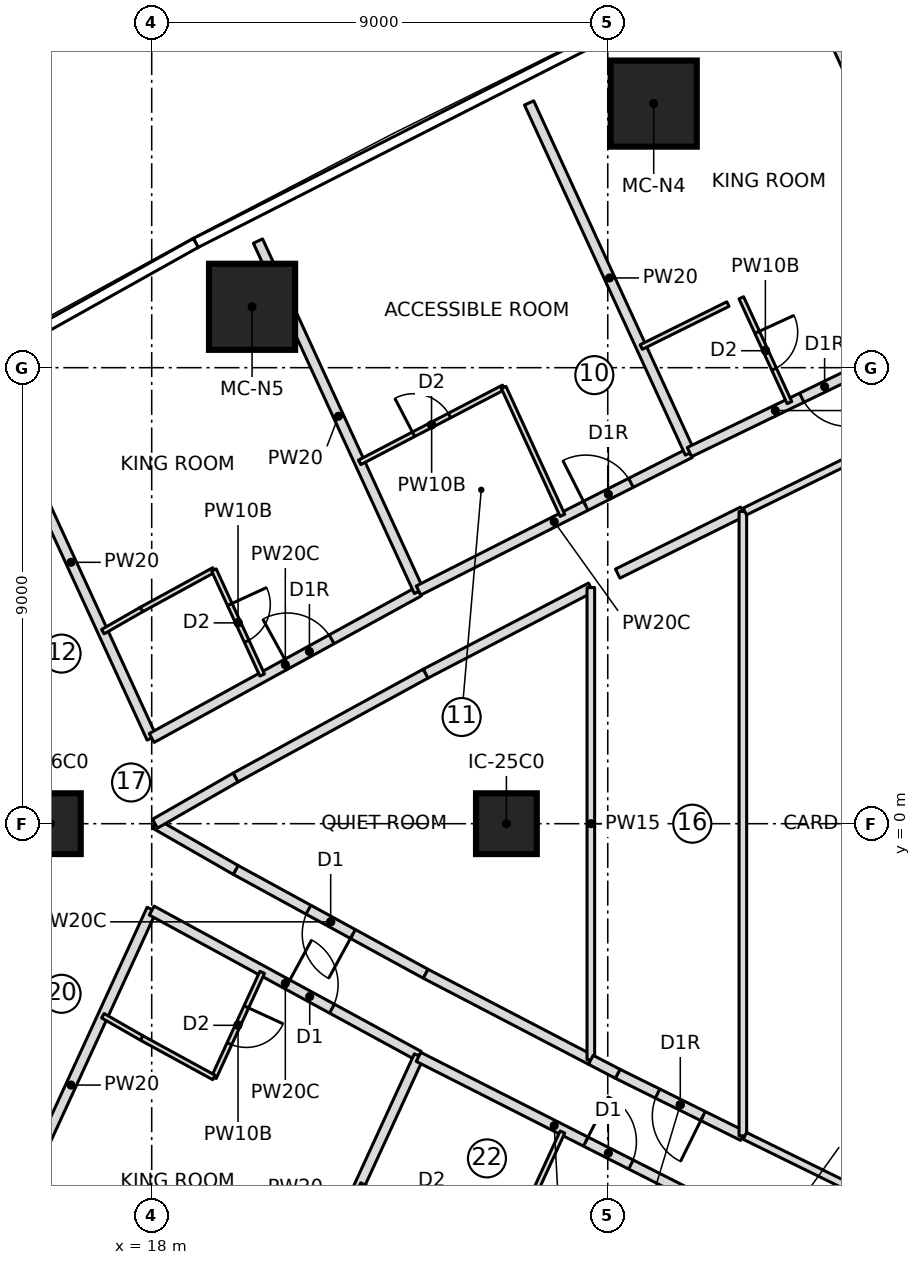
"""IFC4 building model, lengths in metres.
Left out: names, types, materials, properties, quantities, classifications, styles, units other than length and angle.
Written with IfcOpenShell. Run it as: python <this file> out.ifc"""

import sys

from ifc_helpers import new_model, si_unit, direction, frame, frame_2d, origin, origin_2d, place, context, subcontext, project, spatial, rectangle, extrude, element, fill, save


model = new_model("IFC4")
c1 = context("Model", 3, precision=1e-05, world=origin(), true_north=direction((0.0, 1.0)))
c2 = subcontext(c1, "Body", "Model", "MODEL_VIEW")
j1 = project(units=[si_unit("LENGTHUNIT", "METRE"), si_unit("PLANEANGLEUNIT", "RADIAN")], contexts=[c1])
p1 = place(None, origin())
s1 = spatial("IfcSite", under=j1, at=p1, CompositionType="ELEMENT")
p2 = place(p1, origin())
s2 = spatial("IfcBuilding", under=s1, at=p2, CompositionType="ELEMENT")
p3 = place(p2, frame((0.0, 0.0, 109.75)))
s3 = spatial("IfcBuildingStorey", under=s2, at=p3, CompositionType="ELEMENT", Elevation=109.75)
for number, where, z_axis, x_axis in (
    (1, (27.907, 14.212, 0.0), (0.0, 0.0, 1.0), (1.0, 0.0, 0.0)),
    (2, (19.981, 10.202, 0.0), (0.0, 0.0, 1.0), (1.0, 0.0, 0.0)),
):
    element("IfcColumn", number, at=place(p3, frame(where, z_axis=z_axis, x_axis=x_axis)), inside=s3, PredefinedType="COLUMN", context=c2, shape_type="SweptSolid", body=[
        extrude(rectangle(XDim=1.7, YDim=1.7, at=origin_2d()), origin(), (0.0, 0.0, 1.0), 3.55),
    ])
for number, where, z_axis, x_axis in (
    (3, (16.0, 0.0, 0.0), (0.0, 0.0, 1.0), (1.0, 0.0, 0.0)),
    (4, (25.0, 0.0, 0.0), (0.0, 0.0, 1.0), (1.0, 0.0, 0.0)),
):
    element("IfcColumn", number, at=place(p3, frame(where, z_axis=z_axis, x_axis=x_axis)), inside=s3, PredefinedType="COLUMN", context=c2, shape_type="SweptSolid", body=[
        extrude(rectangle(XDim=1.2, YDim=1.2, at=origin_2d()), origin(), (0.0, 0.0, 1.0), 3.55),
    ])
p4 = place(p3, frame((14.815, 8.626, 0.0), z_axis=(0.0, 0.0, 1.0), x_axis=(0.417432341259, -0.908708006166, 0.0)))
e5 = element("IfcWall", 5, at=p4, inside=s3, PredefinedType="PARTITIONING", context=c2, shape_type="SweptSolid", body=[
    extrude(rectangle(XDim=7.631, YDim=0.2, at=frame_2d((3.815, 0.0))), origin(), (0.0, 0.0, 1.0), 3.25),
])
p5 = place(p3, frame((18.0, 1.692, 0.0), z_axis=(0.0, 0.0, 1.0), x_axis=(0.876809096721, 0.480838650597, 0.0)))
e6 = element("IfcWall", 6, at=p5, inside=s3, PredefinedType="PARTITIONING", context=c2, shape_type="SweptSolid", body=[
    extrude(rectangle(XDim=6.015, YDim=0.2, at=frame_2d((3.008, 0.0))), origin(), (0.0, 0.0, 1.0), 3.25),
])
p6 = place(p5, frame((3.05, 0.0, 0.0)))
e7 = element("IfcOpeningElement", 7, at=p6, cuts=e6, PredefinedType="OPENING", context=c2, shape_type="SweptSolid", body=[
    extrude(rectangle(XDim=1.0, YDim=2.1, at=frame_2d((0.5, 1.05))), frame((0.0, 0.11, 0.0), z_axis=(0.0, -1.0, 0.0), x_axis=(1.0, 0.0, 0.0)), (0.0, 0.0, 1.0), 0.22),
])
p7 = place(p3, frame((17.036, 3.79, 0.0), z_axis=(0.0, 0.0, 1.0), x_axis=(0.867629162742, 0.497211862248, 0.0)))
e8 = element("IfcWall", 8, at=p7, inside=s3, PredefinedType="PARTITIONING", context=c2, shape_type="SweptSolid", body=[
    extrude(rectangle(XDim=0.882, YDim=0.1, at=frame_2d((0.441, 0.0))), origin(), (0.0, 0.0, 1.0), 3.25),
])
p8 = place(p3, frame((17.801, 4.229, 0.0), z_axis=(0.0, 0.0, 1.0), x_axis=(0.877424481957, 0.479714788663, 0.0)))
e9 = element("IfcWall", 9, at=p8, inside=s3, PredefinedType="PARTITIONING", context=c2, shape_type="SweptSolid", body=[
    extrude(rectangle(XDim=1.625, YDim=0.1, at=frame_2d((0.813, 0.0))), origin(), (0.0, 0.0, 1.0), 3.25),
])
p9 = place(p3, frame((19.228, 5.008, 0.0), z_axis=(0.0, 0.0, 1.0), x_axis=(0.417450047292, -0.908699872354, 0.0)))
e10 = element("IfcWall", 10, at=p9, inside=s3, PredefinedType="PARTITIONING", context=c2, shape_type="SweptSolid", body=[
    extrude(rectangle(XDim=2.283, YDim=0.1, at=frame_2d((1.141, 0.0))), origin(), (0.0, 0.0, 1.0), 3.25),
])
p10 = place(p9, frame((0.75, 0.0, 0.0)))
e11 = element("IfcOpeningElement", 11, at=p10, cuts=e10, PredefinedType="OPENING", context=c2, shape_type="SweptSolid", body=[
    extrude(rectangle(XDim=0.8, YDim=2.1, at=frame_2d((0.4, 1.05))), frame((0.0, 0.06, 0.0), z_axis=(0.0, -1.0, 0.0), x_axis=(1.0, 0.0, 0.0)), (0.0, 0.0, 1.0), 0.12),
])
p11 = place(p3, frame((23.274, 4.584, 0.0), z_axis=(0.0, 0.0, 1.0), x_axis=(-0.417440028355, 0.908704474913, 0.0)))
e12 = element("IfcWall", 12, at=p11, inside=s3, PredefinedType="PARTITIONING", context=c2, shape_type="SweptSolid", body=[
    extrude(rectangle(XDim=7.61, YDim=0.2, at=frame_2d((3.805, 0.0))), origin(), (0.0, 0.0, 1.0), 3.25),
])
p12 = place(p3, frame((23.266, 4.602, 0.0), z_axis=(0.0, 0.0, 1.0), x_axis=(0.892007141151, 0.452021304958, 0.0)))
e13 = element("IfcWall", 13, at=p12, inside=s3, PredefinedType="PARTITIONING", context=c2, shape_type="SweptSolid", body=[
    extrude(rectangle(XDim=6.004, YDim=0.2, at=frame_2d((3.002, 0.0))), origin(), (0.0, 0.0, 1.0), 3.25),
])
p13 = place(p12, frame((3.7, 0.0, 0.0)))
e14 = element("IfcOpeningElement", 14, at=p13, cuts=e13, PredefinedType="OPENING", context=c2, shape_type="SweptSolid", body=[
    extrude(rectangle(XDim=1.0, YDim=2.1, at=frame_2d((0.5, 1.05))), frame((0.0, 0.11, 0.0), z_axis=(0.0, -1.0, 0.0), x_axis=(1.0, 0.0, 0.0)), (0.0, 0.0, 1.0), 0.22),
])
p14 = place(p3, frame((22.104, 7.132, 0.0), z_axis=(0.0, 0.0, 1.0), x_axis=(0.886865947566, 0.46202682936, 0.0)))
e15 = element("IfcWall", 15, at=p14, inside=s3, PredefinedType="PARTITIONING", context=c2, shape_type="SweptSolid", body=[
    extrude(rectangle(XDim=3.204, YDim=0.1, at=frame_2d((1.602, 0.0))), origin(), (0.0, 0.0, 1.0), 3.25),
])
p15 = place(p14, frame((1.2, 0.0, 0.0)))
e16 = element("IfcOpeningElement", 16, at=p15, cuts=e15, PredefinedType="OPENING", context=c2, shape_type="SweptSolid", body=[
    extrude(rectangle(XDim=0.8, YDim=2.1, at=frame_2d((0.4, 1.05))), frame((0.0, 0.06, 0.0), z_axis=(0.0, -1.0, 0.0), x_axis=(1.0, 0.0, 0.0)), (0.0, 0.0, 1.0), 0.12),
])
p16 = place(p3, frame((24.945, 8.612, 0.0), z_axis=(0.0, 0.0, 1.0), x_axis=(0.417431588167, -0.908708352113, 0.0)))
e17 = element("IfcWall", 17, at=p16, inside=s3, PredefinedType="PARTITIONING", context=c2, shape_type="SweptSolid", body=[
    extrude(rectangle(XDim=2.781, YDim=0.1, at=frame_2d((1.39, 0.0))), origin(), (0.0, 0.0, 1.0), 3.25),
])
p17 = place(p3, frame((28.622, 7.316, 0.0), z_axis=(0.0, 0.0, 1.0), x_axis=(-0.417428513692, 0.908709764422, 0.0)))
e18 = element("IfcWall", 18, at=p17, inside=s3, PredefinedType="PARTITIONING", context=c2, shape_type="SweptSolid", body=[
    extrude(rectangle(XDim=7.603, YDim=0.2, at=frame_2d((3.802, 0.0))), origin(), (0.0, 0.0, 1.0), 3.25),
])
p18 = place(p3, frame((32.0, 8.973, 0.0), z_axis=(0.0, 0.0, 1.0), x_axis=(-0.900216696569, -0.435442188147, 0.0)))
e19 = element("IfcWall", 19, at=p18, inside=s3, PredefinedType="PARTITIONING", context=c2, shape_type="SweptSolid", body=[
    extrude(rectangle(XDim=3.762, YDim=0.2, at=frame_2d((1.881, 0.0))), origin(), (0.0, 0.0, 1.0), 3.25),
])
p19 = place(p18, frame((0.3, 0.0, 0.0)))
e20 = element("IfcOpeningElement", 20, at=p19, cuts=e19, PredefinedType="OPENING", context=c2, shape_type="SweptSolid", body=[
    extrude(rectangle(XDim=1.0, YDim=2.1, at=frame_2d((0.5, 1.05))), frame((0.0, 0.11, 0.0), z_axis=(0.0, -1.0, 0.0), x_axis=(1.0, 0.0, 0.0)), (0.0, 0.0, 1.0), 0.22),
])
p20 = place(p3, frame((27.661, 9.407, 0.0), z_axis=(0.0, 0.0, 1.0), x_axis=(0.895982200486, 0.444089964324, 0.0)))
e21 = element("IfcWall", 21, at=p20, inside=s3, PredefinedType="PARTITIONING", context=c2, shape_type="SweptSolid", body=[
    extrude(rectangle(XDim=1.909, YDim=0.1, at=frame_2d((0.954, 0.0))), origin(), (0.0, 0.0, 1.0), 3.25),
])
p21 = place(p3, frame((29.635, 10.38, 0.0), z_axis=(0.0, 0.0, 1.0), x_axis=(0.417466676952, -0.908692232626, 0.0)))
e22 = element("IfcWall", 22, at=p21, inside=s3, PredefinedType="PARTITIONING", context=c2, shape_type="SweptSolid", body=[
    extrude(rectangle(XDim=2.277, YDim=0.1, at=frame_2d((1.139, 0.0))), origin(), (0.0, 0.0, 1.0), 3.25),
])
p22 = place(p21, frame((0.75, 0.0, 0.0)))
e23 = element("IfcOpeningElement", 23, at=p22, cuts=e22, PredefinedType="OPENING", context=c2, shape_type="SweptSolid", body=[
    extrude(rectangle(XDim=0.8, YDim=2.1, at=frame_2d((0.4, 1.05))), frame((0.0, 0.06, 0.0), z_axis=(0.0, -1.0, 0.0), x_axis=(1.0, 0.0, 0.0)), (0.0, 0.0, 1.0), 0.12),
])
p23 = place(p3, frame((33.532, 11.0, 0.0), z_axis=(0.0, 0.0, 1.0), x_axis=(-0.417441426461, 0.908703832651, 0.0)))
e24 = element("IfcWall", 24, at=p23, inside=s3, PredefinedType="PARTITIONING", context=c2, shape_type="SweptSolid", body=[
    extrude(rectangle(XDim=6.399, YDim=0.2, at=frame_2d((3.2, 0.0))), origin(), (0.0, 0.0, 1.0), 3.25),
])
p24 = place(p3, frame((14.815, -8.626, 0.0), z_axis=(0.0, 0.0, 1.0), x_axis=(0.417432341259, 0.908708006166, 0.0)))
e25 = element("IfcWall", 25, at=p24, inside=s3, PredefinedType="PARTITIONING", context=c2, shape_type="SweptSolid", body=[
    extrude(rectangle(XDim=7.631, YDim=0.2, at=frame_2d((3.815, 0.0))), origin(), (0.0, 0.0, 1.0), 3.25),
])
p25 = place(p3, frame((18.0, -1.715, 0.0), z_axis=(0.0, 0.0, 1.0), x_axis=(0.878415628048, -0.477897462225, 0.0)))
e26 = element("IfcWall", 26, at=p25, inside=s3, PredefinedType="PARTITIONING", context=c2, shape_type="SweptSolid", body=[
    extrude(rectangle(XDim=6.004, YDim=0.2, at=frame_2d((3.002, 0.0))), origin(), (0.0, 0.0, 1.0), 3.25),
])
p26 = place(p25, frame((3.05, 0.0, 0.0)))
e27 = element("IfcOpeningElement", 27, at=p26, cuts=e26, PredefinedType="OPENING", context=c2, shape_type="SweptSolid", body=[
    extrude(rectangle(XDim=1.0, YDim=2.1, at=frame_2d((0.5, 1.05))), frame((0.0, 0.11, 0.0), z_axis=(0.0, -1.0, 0.0), x_axis=(1.0, 0.0, 0.0)), (0.0, 0.0, 1.0), 0.22),
])
p27 = place(p3, frame((20.18, -2.934, 0.0), z_axis=(0.0, 0.0, 1.0), x_axis=(-0.417450047292, -0.908699872354, 0.0)))
e28 = element("IfcWall", 28, at=p27, inside=s3, PredefinedType="PARTITIONING", context=c2, shape_type="SweptSolid", body=[
    extrude(rectangle(XDim=2.283, YDim=0.1, at=frame_2d((1.141, 0.0))), origin(), (0.0, 0.0, 1.0), 3.25),
])
p28 = place(p27, frame((0.75, 0.0, 0.0)))
e29 = element("IfcOpeningElement", 29, at=p28, cuts=e28, PredefinedType="OPENING", context=c2, shape_type="SweptSolid", body=[
    extrude(rectangle(XDim=0.8, YDim=2.1, at=frame_2d((0.4, 1.05))), frame((0.0, 0.06, 0.0), z_axis=(0.0, -1.0, 0.0), x_axis=(1.0, 0.0, 0.0)), (0.0, 0.0, 1.0), 0.12),
])
p29 = place(p3, frame((19.228, -5.008, 0.0), z_axis=(0.0, 0.0, 1.0), x_axis=(-0.877424481957, 0.479714788663, 0.0)))
e30 = element("IfcWall", 30, at=p29, inside=s3, PredefinedType="PARTITIONING", context=c2, shape_type="SweptSolid", body=[
    extrude(rectangle(XDim=1.625, YDim=0.1, at=frame_2d((0.813, 0.0))), origin(), (0.0, 0.0, 1.0), 3.25),
])
p30 = place(p3, frame((17.801, -4.229, 0.0), z_axis=(0.0, 0.0, 1.0), x_axis=(-0.867629162742, 0.497211862248, 0.0)))
e31 = element("IfcWall", 31, at=p30, inside=s3, PredefinedType="PARTITIONING", context=c2, shape_type="SweptSolid", body=[
    extrude(rectangle(XDim=0.882, YDim=0.1, at=frame_2d((0.441, 0.0))), origin(), (0.0, 0.0, 1.0), 3.25),
])
p31 = place(p3, frame((20.098, -11.499, 0.0), z_axis=(0.0, 0.0, 1.0), x_axis=(0.417440028355, 0.908704474913, 0.0)))
e32 = element("IfcWall", 32, at=p31, inside=s3, PredefinedType="PARTITIONING", context=c2, shape_type="SweptSolid", body=[
    extrude(rectangle(XDim=7.61, YDim=0.2, at=frame_2d((3.805, 0.0))), origin(), (0.0, 0.0, 1.0), 3.25),
])
p32 = place(p3, frame((23.266, -4.602, 0.0), z_axis=(0.0, 0.0, 1.0), x_axis=(0.892007141151, -0.452021304958, 0.0)))
e33 = element("IfcWall", 33, at=p32, inside=s3, PredefinedType="PARTITIONING", context=c2, shape_type="SweptSolid", body=[
    extrude(rectangle(XDim=6.004, YDim=0.2, at=frame_2d((3.002, 0.0))), origin(), (0.0, 0.0, 1.0), 3.25),
])
p33 = place(p32, frame((3.7, 0.0, 0.0)))
e34 = element("IfcOpeningElement", 34, at=p33, cuts=e33, PredefinedType="OPENING", context=c2, shape_type="SweptSolid", body=[
    extrude(rectangle(XDim=1.0, YDim=2.1, at=frame_2d((0.5, 1.05))), frame((0.0, 0.11, 0.0), z_axis=(0.0, -1.0, 0.0), x_axis=(1.0, 0.0, 0.0)), (0.0, 0.0, 1.0), 0.22),
])
p34 = place(p3, frame((26.106, -6.085, 0.0), z_axis=(0.0, 0.0, 1.0), x_axis=(-0.417431588167, -0.908708352113, 0.0)))
e35 = element("IfcWall", 35, at=p34, inside=s3, PredefinedType="PARTITIONING", context=c2, shape_type="SweptSolid", body=[
    extrude(rectangle(XDim=2.781, YDim=0.1, at=frame_2d((1.39, 0.0))), origin(), (0.0, 0.0, 1.0), 3.25),
])
p35 = place(p3, frame((24.945, -8.612, 0.0), z_axis=(0.0, 0.0, 1.0), x_axis=(-0.886865947566, 0.46202682936, 0.0)))
e36 = element("IfcWall", 36, at=p35, inside=s3, PredefinedType="PARTITIONING", context=c2, shape_type="SweptSolid", body=[
    extrude(rectangle(XDim=3.204, YDim=0.1, at=frame_2d((1.602, 0.0))), origin(), (0.0, 0.0, 1.0), 3.25),
])
p36 = place(p35, frame((1.2, 0.0, 0.0)))
e37 = element("IfcOpeningElement", 37, at=p36, cuts=e36, PredefinedType="OPENING", context=c2, shape_type="SweptSolid", body=[
    extrude(rectangle(XDim=0.8, YDim=2.1, at=frame_2d((0.4, 1.05))), frame((0.0, 0.06, 0.0), z_axis=(0.0, -1.0, 0.0), x_axis=(1.0, 0.0, 0.0)), (0.0, 0.0, 1.0), 0.12),
])
p37 = place(p3, frame((23.407, -2.962, 0.0), z_axis=(0.0, 0.0, 1.0), x_axis=(-0.877465075585, 0.479640533242, 0.0)))
e38 = element("IfcWall", 38, at=p37, inside=s3, PredefinedType="PARTITIONING", context=c2, shape_type="SweptSolid", body=[
    extrude(rectangle(XDim=4.273, YDim=0.2, at=frame_2d((2.137, 0.0))), origin(), (0.0, 0.0, 1.0), 3.25),
])
p38 = place(p37, frame((1.636, 0.0, 0.0)))
e39 = element("IfcOpeningElement", 39, at=p38, cuts=e38, PredefinedType="OPENING", context=c2, shape_type="SweptSolid", body=[
    extrude(rectangle(XDim=1.0, YDim=2.1, at=frame_2d((0.5, 1.05))), frame((0.0, 0.11, 0.0), z_axis=(0.0, -1.0, 0.0), x_axis=(1.0, 0.0, 0.0)), (0.0, 0.0, 1.0), 0.22),
])
for number, where, z_axis, x_axis in (
    (40, (19.657, -0.912, 0.0), (0.0, 0.0, 1.0), (-0.868, 0.497, 0.0)),
    (41, (18.065, 0.0, 0.0), (0.0, 0.0, 1.0), (0.868, 0.497, 0.0)),
):
    element("IfcWall", number, at=place(p3, frame(where, z_axis=z_axis, x_axis=x_axis)), inside=s3, PredefinedType="PARTITIONING", context=c2, shape_type="SweptSolid", body=[
        extrude(rectangle(XDim=1.835, YDim=0.2, at=frame_2d((0.918, 0.0))), origin(), (0.0, 0.0, 1.0), 3.25),
    ])
p39 = place(p3, frame((19.657, 0.912, 0.0), z_axis=(0.0, 0.0, 1.0), x_axis=(0.877465075585, 0.479640533242, 0.0)))
e42 = element("IfcWall", 42, at=p39, inside=s3, PredefinedType="PARTITIONING", context=c2, shape_type="SweptSolid", body=[
    extrude(rectangle(XDim=4.273, YDim=0.2, at=frame_2d((2.137, 0.0))), origin(), (0.0, 0.0, 1.0), 3.25),
])
for number, where, z_axis, x_axis in (
    (43, (23.407, 2.962, 0.0), (0.0, 0.0, 1.0), (0.887, 0.462, 0.0)),
    (44, (26.667, -4.66, 0.0), (0.0, 0.0, 1.0), (-0.887, 0.462, 0.0)),
):
    element("IfcWall", number, at=place(p3, frame(where, z_axis=z_axis, x_axis=x_axis)), inside=s3, PredefinedType="PARTITIONING", context=c2, shape_type="SweptSolid", body=[
        extrude(rectangle(XDim=3.676, YDim=0.2, at=frame_2d((1.838, 0.0))), origin(), (0.0, 0.0, 1.0), 3.25),
    ])
p40 = place(p3, frame((26.667, -4.66, 0.0), z_axis=(0.0, 0.0, 1.0), x_axis=(0.0, 1.0, 0.0)))
e45 = element("IfcWall", 45, at=p40, inside=s3, PredefinedType="PARTITIONING", context=c2, shape_type="SweptSolid", body=[
    extrude(rectangle(XDim=9.32, YDim=0.15, at=frame_2d((4.66, 0.0))), origin(), (0.0, 0.0, 1.0), 3.25),
])
p41 = place(p3, frame((29.667, -6.16, 0.0), z_axis=(0.0, 0.0, 1.0), x_axis=(-0.895945057464, 0.444164895062, 0.0)))
e46 = element("IfcWall", 46, at=p41, inside=s3, PredefinedType="PARTITIONING", context=c2, shape_type="SweptSolid", body=[
    extrude(rectangle(XDim=2.757, YDim=0.2, at=frame_2d((1.378, 0.0))), origin(), (0.0, 0.0, 1.0), 3.25),
])
p42 = place(p41, frame((0.878, 0.0, 0.0)))
e47 = element("IfcOpeningElement", 47, at=p42, cuts=e46, PredefinedType="OPENING", context=c2, shape_type="SweptSolid", body=[
    extrude(rectangle(XDim=1.0, YDim=2.1, at=frame_2d((0.5, 1.05))), frame((0.0, 0.11, 0.0), z_axis=(0.0, -1.0, 0.0), x_axis=(1.0, 0.0, 0.0)), (0.0, 0.0, 1.0), 0.22),
])
p43 = place(p3, frame((27.196, 4.936, 0.0), z_axis=(0.0, 0.0, 1.0), x_axis=(0.895945057464, 0.444164895062, 0.0)))
e48 = element("IfcWall", 48, at=p43, inside=s3, PredefinedType="PARTITIONING", context=c2, shape_type="SweptSolid", body=[
    extrude(rectangle(XDim=2.757, YDim=0.2, at=frame_2d((1.378, 0.0))), origin(), (0.0, 0.0, 1.0), 3.25),
])
p44 = place(p3, frame((29.667, -6.16, 0.0), z_axis=(0.0, 0.0, 1.0), x_axis=(0.0, 1.0, 0.0)))
e49 = element("IfcWall", 49, at=p44, inside=s3, PredefinedType="PARTITIONING", context=c2, shape_type="SweptSolid", body=[
    extrude(rectangle(XDim=12.321, YDim=0.15, at=frame_2d((6.16, 0.0))), origin(), (0.0, 0.0, 1.0), 3.25),
])
for number, where, z_axis, x_axis in (
    (50, (31.995, -7.285, 0.0), (0.0, 0.0, 1.0), (-0.898, 0.441, 0.0)),
    (51, (29.707, 6.162, 0.0), (0.0, 0.0, 1.0), (0.898, 0.441, 0.0)),
):
    element("IfcWall", number, at=place(p3, frame(where, z_axis=z_axis, x_axis=x_axis)), inside=s3, PredefinedType="PARTITIONING", context=c2, shape_type="SweptSolid", body=[
        extrude(rectangle(XDim=2.549, YDim=0.15, at=frame_2d((1.275, 0.0))), origin(), (0.0, 0.0, 1.0), 3.25),
    ])
p45 = place(p3, frame((27.196, -4.936, 0.0), z_axis=(0.0, 0.0, 1.0), x_axis=(-0.886948968309, 0.46186743511, 0.0)))
e52 = element("IfcWall", 52, at=p45, inside=s3, PredefinedType="PARTITIONING", context=c2, shape_type="SweptSolid", body=[
    extrude(rectangle(XDim=0.597, YDim=0.2, at=frame_2d((0.299, 0.0))), origin(), (0.0, 0.0, 1.0), 3.25),
])
p46 = place(p10, origin())
e53 = element("IfcDoor", 53, at=p46, inside=s3, OperationType="SINGLE_SWING_LEFT", PredefinedType="DOOR", context=c2, shape_type="SweptSolid", body=[
    extrude(rectangle(XDim=0.8, YDim=2.1, at=frame_2d((0.4, 1.05))), frame((0.0, 0.025, 0.0), z_axis=(0.0, -1.0, 0.0), x_axis=(1.0, 0.0, 0.0)), (0.0, 0.0, 1.0), 0.05),
])
fill(e11, e53)
p47 = place(p6, origin())
e54 = element("IfcDoor", 54, at=p47, inside=s3, OperationType="SINGLE_SWING_RIGHT", PredefinedType="DOOR", context=c2, shape_type="SweptSolid", body=[
    extrude(rectangle(XDim=1.0, YDim=2.1, at=frame_2d((0.5, 1.05))), frame((0.0, 0.025, 0.0), z_axis=(0.0, -1.0, 0.0), x_axis=(1.0, 0.0, 0.0)), (0.0, 0.0, 1.0), 0.05),
])
fill(e7, e54)
p48 = place(p15, origin())
e55 = element("IfcDoor", 55, at=p48, inside=s3, OperationType="SINGLE_SWING_LEFT", PredefinedType="DOOR", context=c2, shape_type="SweptSolid", body=[
    extrude(rectangle(XDim=0.8, YDim=2.1, at=frame_2d((0.4, 1.05))), frame((0.0, 0.025, 0.0), z_axis=(0.0, -1.0, 0.0), x_axis=(1.0, 0.0, 0.0)), (0.0, 0.0, 1.0), 0.05),
])
fill(e16, e55)
p49 = place(p13, origin())
e56 = element("IfcDoor", 56, at=p49, inside=s3, OperationType="SINGLE_SWING_RIGHT", PredefinedType="DOOR", context=c2, shape_type="SweptSolid", body=[
    extrude(rectangle(XDim=1.0, YDim=2.1, at=frame_2d((0.5, 1.05))), frame((0.0, 0.025, 0.0), z_axis=(0.0, -1.0, 0.0), x_axis=(1.0, 0.0, 0.0)), (0.0, 0.0, 1.0), 0.05),
])
fill(e14, e56)
p50 = place(p22, origin())
e57 = element("IfcDoor", 57, at=p50, inside=s3, OperationType="SINGLE_SWING_LEFT", PredefinedType="DOOR", context=c2, shape_type="SweptSolid", body=[
    extrude(rectangle(XDim=0.8, YDim=2.1, at=frame_2d((0.4, 1.05))), frame((0.0, 0.025, 0.0), z_axis=(0.0, -1.0, 0.0), x_axis=(1.0, 0.0, 0.0)), (0.0, 0.0, 1.0), 0.05),
])
fill(e23, e57)
p51 = place(p19, origin())
e58 = element("IfcDoor", 58, at=p51, inside=s3, OperationType="SINGLE_SWING_RIGHT", PredefinedType="DOOR", context=c2, shape_type="SweptSolid", body=[
    extrude(rectangle(XDim=1.0, YDim=2.1, at=frame_2d((0.5, 1.05))), frame((0.0, 0.025, 0.0), z_axis=(0.0, -1.0, 0.0), x_axis=(1.0, 0.0, 0.0)), (0.0, 0.0, 1.0), 0.05),
])
fill(e20, e58)
p52 = place(p28, origin())
e59 = element("IfcDoor", 59, at=p52, inside=s3, OperationType="SINGLE_SWING_LEFT", PredefinedType="DOOR", context=c2, shape_type="SweptSolid", body=[
    extrude(rectangle(XDim=0.8, YDim=2.1, at=frame_2d((0.4, 1.05))), frame((0.0, 0.025, 0.0), z_axis=(0.0, -1.0, 0.0), x_axis=(1.0, 0.0, 0.0)), (0.0, 0.0, 1.0), 0.05),
])
fill(e29, e59)
p53 = place(p26, origin())
e60 = element("IfcDoor", 60, at=p53, inside=s3, OperationType="SINGLE_SWING_LEFT", PredefinedType="DOOR", context=c2, shape_type="SweptSolid", body=[
    extrude(rectangle(XDim=1.0, YDim=2.1, at=frame_2d((0.5, 1.05))), frame((0.0, 0.025, 0.0), z_axis=(0.0, -1.0, 0.0), x_axis=(1.0, 0.0, 0.0)), (0.0, 0.0, 1.0), 0.05),
])
fill(e27, e60)
p54 = place(p33, origin())
e61 = element("IfcDoor", 61, at=p54, inside=s3, OperationType="SINGLE_SWING_LEFT", PredefinedType="DOOR", context=c2, shape_type="SweptSolid", body=[
    extrude(rectangle(XDim=1.0, YDim=2.1, at=frame_2d((0.5, 1.05))), frame((0.0, 0.025, 0.0), z_axis=(0.0, -1.0, 0.0), x_axis=(1.0, 0.0, 0.0)), (0.0, 0.0, 1.0), 0.05),
])
fill(e34, e61)
p55 = place(p38, origin())
e62 = element("IfcDoor", 62, at=p55, inside=s3, OperationType="SINGLE_SWING_LEFT", PredefinedType="DOOR", context=c2, shape_type="SweptSolid", body=[
    extrude(rectangle(XDim=1.0, YDim=2.1, at=frame_2d((0.5, 1.05))), frame((0.0, 0.025, 0.0), z_axis=(0.0, -1.0, 0.0), x_axis=(1.0, 0.0, 0.0)), (0.0, 0.0, 1.0), 0.05),
])
fill(e39, e62)
p56 = place(p42, origin())
e63 = element("IfcDoor", 63, at=p56, inside=s3, OperationType="SINGLE_SWING_RIGHT", PredefinedType="DOOR", context=c2, shape_type="SweptSolid", body=[
    extrude(rectangle(XDim=1.0, YDim=2.1, at=frame_2d((0.5, 1.05))), frame((0.0, 0.025, 0.0), z_axis=(0.0, -1.0, 0.0), x_axis=(1.0, 0.0, 0.0)), (0.0, 0.0, 1.0), 0.05),
])
fill(e47, e63)
save(model, sys.argv[1])
